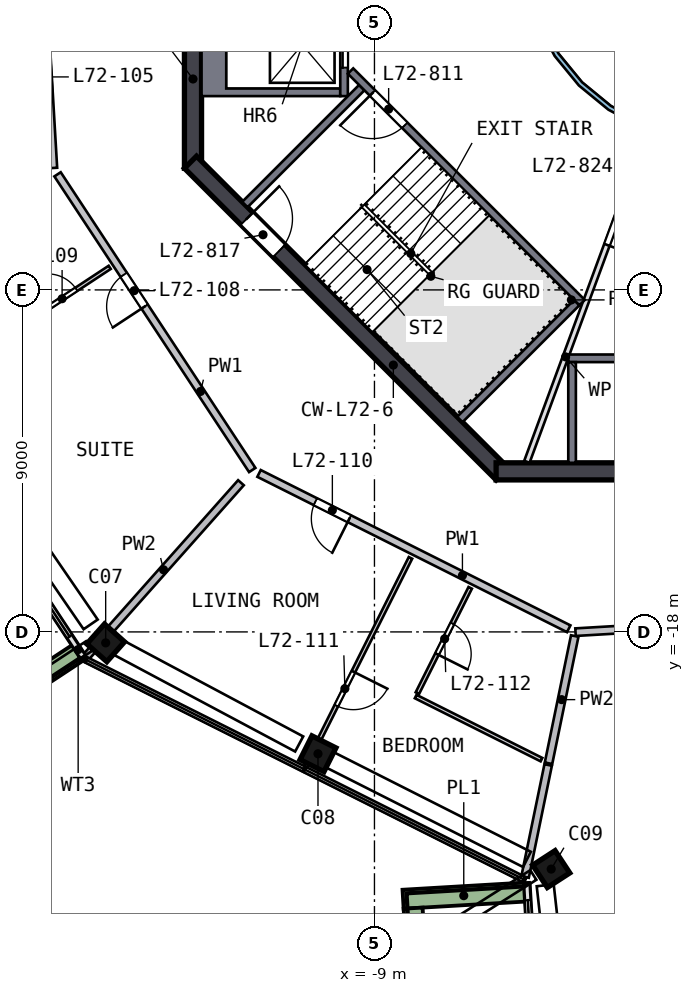
"""IFC4 building model, lengths in metres.
Left out: names, types, materials, properties, quantities, classifications, styles, units other than length and angle.
Written with IfcOpenShell. Run it as: python <this file> out.ifc"""

import sys

from ifc_helpers import new_model, si_unit, direction, frame, frame_2d, origin, origin_2d, place, context, subcontext, project, spatial, polyline, rectangle, outline, extrude, element, fill, save


model = new_model("IFC4")
c1 = context("Model", 3, precision=1e-05, world=origin(), true_north=direction((0.0, 1.0)))
c2 = subcontext(c1, "Body", "Model", "MODEL_VIEW")
j1 = project(units=[si_unit("LENGTHUNIT", "METRE"), si_unit("PLANEANGLEUNIT", "RADIAN")], contexts=[c1])
p1 = place(None, origin())
s1 = spatial("IfcSite", under=j1, at=p1, CompositionType="ELEMENT")
p2 = place(p1, origin())
s2 = spatial("IfcBuilding", under=s1, at=p2, CompositionType="ELEMENT")
p3 = place(p2, frame((0.0, 0.0, 291.5)))
s3 = spatial("IfcBuildingStorey", under=s2, at=p3, CompositionType="ELEMENT", Elevation=291.5)
p4 = place(p3, frame((-16.178, -18.196, 0.0), z_axis=(0.087194218, -0.076247429, 0.993269096), x_axis=(-0.742135032, 0.660166681, 0.115825506)))
e1 = element("IfcColumn", 1, at=p4, inside=s3, PredefinedType="COLUMN", context=c2, shape_type="SweptSolid", body=[
    extrude(rectangle(XDim=0.7, YDim=0.7, at=origin_2d()), origin(), (0.0, 0.0, 1.0), 3.212),
])
p5 = place(p3, frame((-10.608, -21.147, 0.0), z_axis=(0.100992141, -0.049659539, 0.993647079), x_axis=(0.88792749, -0.446004698, -0.112537025)))
e2 = element("IfcColumn", 2, at=p5, inside=s3, PredefinedType="COLUMN", context=c2, shape_type="SweptSolid", body=[
    extrude(rectangle(XDim=0.7, YDim=0.7, at=origin_2d()), origin(), (0.0, 0.0, 1.0), 3.21),
])
p6 = place(p3, frame((-4.488, -24.217, 0.0), z_axis=(0.11530423, -0.020370161, 0.993121338), x_axis=(-0.542404026, 0.836287858, 0.08012797)))
e3 = element("IfcColumn", 3, at=p6, inside=s3, PredefinedType="COLUMN", context=c2, shape_type="SweptSolid", body=[
    extrude(rectangle(XDim=0.7, YDim=0.7, at=origin_2d()), origin(), (0.0, 0.0, 1.0), 3.212),
])
p7 = place(p3, frame((-13.775, 5.799, 0.0), z_axis=(0.0, 0.0, 1.0), x_axis=(0.0, -1.0, 0.0)))
e4 = element("IfcWall", 4, at=p7, inside=s3, PredefinedType="SHEAR", context=c2, shape_type="SweptSolid", body=[
    extrude(rectangle(XDim=11.598, YDim=0.45, at=frame_2d((5.799, 0.0))), origin(), (0.0, 0.0, 1.0), 3.5),
])
p8 = place(p7, frame((4.899, 0.0, 0.0)))
e5 = element("IfcOpeningElement", 5, at=p8, cuts=e4, PredefinedType="OPENING", context=c2, shape_type="SweptSolid", body=[
    extrude(rectangle(XDim=1.8, YDim=2.1, at=frame_2d((0.9, 1.05))), frame((0.0, 0.235, 0.0), z_axis=(0.0, -1.0, 0.0), x_axis=(1.0, 0.0, 0.0)), (0.0, 0.0, 1.0), 0.47),
])
p9 = place(p3, frame((-13.841, -5.64, 0.0), z_axis=(0.0, 0.0, 1.0), x_axis=(0.707106781, -0.707106781, 0.0)))
e6 = element("IfcWall", 6, at=p9, inside=s3, PredefinedType="SHEAR", context=c2, shape_type="SweptSolid", body=[
    extrude(rectangle(XDim=11.598, YDim=0.45, at=frame_2d((5.799, 0.0))), origin(), (0.0, 0.0, 1.0), 3.5),
])
p10 = place(p9, frame((2.099, 0.0, 0.0)))
e7 = element("IfcOpeningElement", 7, at=p10, cuts=e6, PredefinedType="OPENING", context=c2, shape_type="SweptSolid", body=[
    extrude(rectangle(XDim=1.2, YDim=2.1, at=frame_2d((0.6, 1.05))), frame((0.0, 0.235, 0.0), z_axis=(0.0, -1.0, 0.0), x_axis=(1.0, 0.0, 0.0)), (0.0, 0.0, 1.0), 0.47),
])
p11 = place(p3, frame((-5.799, -13.775, 0.0), z_axis=(0.0, 0.0, 1.0), x_axis=(1.0, 0.0, 0.0)))
e8 = element("IfcWall", 8, at=p11, inside=s3, PredefinedType="SHEAR", context=c2, shape_type="SweptSolid", body=[
    extrude(rectangle(XDim=11.598, YDim=0.45, at=frame_2d((5.799, 0.0))), origin(), (0.0, 0.0, 1.0), 3.5),
])
p12 = place(p3, frame((-18.564, -15.781, 0.0), z_axis=(0.0, 0.0, 1.0), x_axis=(0.54985724, -0.835258652, 0.0)))
e9 = element("IfcWall", 9, at=p12, inside=s3, PredefinedType="SOLIDWALL", context=c2, shape_type="SweptSolid", body=[
    extrude(rectangle(XDim=3.427, YDim=0.15, at=frame_2d((1.713, 0.0))), origin(), (0.0, 0.0, 1.0), 2.525),
])
p13 = place(p12, frame((0.4, 0.0, 0.0)))
e10 = element("IfcOpeningElement", 10, at=p13, cuts=e9, PredefinedType="OPENING", context=c2, shape_type="SweptSolid", body=[
    extrude(rectangle(XDim=2.4, YDim=2.4, at=frame_2d((1.2, 1.2))), frame((0.0, 0.085, 0.0), z_axis=(0.0, -1.0, 0.0), x_axis=(1.0, 0.0, 0.0)), (0.0, 0.0, 1.0), 0.17),
])
p14 = place(p3, frame((-4.988, -24.663, 0.0), z_axis=(0.0, 0.0, 1.0), x_axis=(0.058592325, -0.998281994, 0.0)))
e11 = element("IfcWall", 11, at=p14, inside=s3, PredefinedType="SOLIDWALL", context=c2, shape_type="SweptSolid", body=[
    extrude(rectangle(XDim=3.2, YDim=0.15, at=frame_2d((1.6, 0.0))), origin(), (0.0, 0.0, 1.0), 2.525),
])
p15 = place(p14, frame((0.4, 0.0, 0.0)))
e12 = element("IfcOpeningElement", 12, at=p15, cuts=e11, PredefinedType="OPENING", context=c2, shape_type="SweptSolid", body=[
    extrude(rectangle(XDim=2.4, YDim=2.4, at=frame_2d((1.2, 1.2))), frame((0.0, 0.085, 0.0), z_axis=(0.0, -1.0, 0.0), x_axis=(1.0, 0.0, 0.0)), (0.0, 0.0, 1.0), 0.17),
])
p16 = place(p3, frame((-19.08, -20.044, 0.0), z_axis=(0.0, 0.0, 1.0), x_axis=(0.835250913, 0.549868995, 0.0)))
e13 = element("IfcWall", 13, at=p16, inside=s3, PredefinedType="SOLIDWALL", context=c2, shape_type="SweptSolid", body=[
    extrude(rectangle(XDim=2.699, YDim=0.5, at=frame_2d((1.35, 0.0))), origin(), (0.0, 0.0, 1.0), 0.7),
])
p17 = place(p3, frame((-5.053, -24.847, 0.0), z_axis=(0.0, 0.0, 1.0), x_axis=(-0.998280684, -0.058614646, 0.0)))
e14 = element("IfcWall", 14, at=p17, inside=s3, PredefinedType="SOLIDWALL", context=c2, shape_type="SweptSolid", body=[
    extrude(rectangle(XDim=3.199, YDim=0.5, at=frame_2d((1.6, 0.0))), origin(), (0.0, 0.0, 1.0), 0.7),
])
p18 = place(p3, frame((-7.983, -25.27, 0.0), z_axis=(0.0, 0.0, 1.0), x_axis=(0.058609711, -0.998280973, 0.0)))
e15 = element("IfcWall", 15, at=p18, inside=s3, PredefinedType="SOLIDWALL", context=c2, shape_type="SweptSolid", body=[
    extrude(rectangle(XDim=9.048, YDim=0.5, at=frame_2d((4.524, 0.0))), origin(), (0.0, 0.0, 1.0), 0.7),
])
p19 = place(p3, origin())
e16 = element("IfcWall", 16, at=p19, inside=s3, PredefinedType="SOLIDWALL", context=c2, shape_type="SweptSolid", body=[
    extrude(outline(polyline([(-13.55, -3.9), (-13.55, -1.2), (-9.9, -1.2), (-9.9, -1.4), (-12.9, -1.4), (-12.9, -3.7), (-9.9, -3.7), (-9.9, -3.9), (-13.55, -3.9)])), origin(), (0.0, 0.0, 1.0), 3.19),
])
p20 = place(p3, frame((-9.8, -1.2, 0.0), z_axis=(0.0, 0.0, 1.0), x_axis=(0.0, -1.0, 0.0)))
e17 = element("IfcWall", 17, at=p20, inside=s3, PredefinedType="SOLIDWALL", context=c2, shape_type="SweptSolid", body=[
    extrude(rectangle(XDim=2.7, YDim=0.2, at=frame_2d((1.35, 0.0))), origin(), (0.0, 0.0, 1.0), 3.19),
])
p21 = place(p20, frame((0.75, 0.0, 0.0)))
e18 = element("IfcOpeningElement", 18, at=p21, cuts=e17, PredefinedType="OPENING", context=c2, shape_type="SweptSolid", body=[
    extrude(rectangle(XDim=1.2, YDim=2.1, at=frame_2d((0.6, 1.05))), frame((0.0, 0.11, 0.0), z_axis=(0.0, -1.0, 0.0), x_axis=(1.0, 0.0, 0.0)), (0.0, 0.0, 1.0), 0.22),
])
p22 = place(p3, frame((-3.9, -10.8, 0.0), z_axis=(0.0, 0.0, 1.0), x_axis=(1.0, 0.0, 0.0)))
e19 = element("IfcWall", 19, at=p22, inside=s3, PredefinedType="SOLIDWALL", context=c2, shape_type="SweptSolid", body=[
    extrude(rectangle(XDim=7.8, YDim=0.2, at=frame_2d((3.9, 0.0))), origin(), (0.0, 0.0, 1.0), 3.19),
])
p23 = place(p22, frame((3.45, 0.0, 0.0)))
e20 = element("IfcOpeningElement", 20, at=p23, cuts=e19, PredefinedType="OPENING", context=c2, shape_type="SweptSolid", body=[
    extrude(rectangle(XDim=0.9, YDim=2.1, at=frame_2d((0.45, 1.05))), frame((0.0, 0.11, 0.0), z_axis=(0.0, -1.0, 0.0), x_axis=(1.0, 0.0, 0.0)), (0.0, 0.0, 1.0), 0.22),
])
p24 = place(p3, frame((-3.8, -10.9, 0.0), z_axis=(0.0, 0.0, 1.0), x_axis=(0.0, -1.0, 0.0)))
e21 = element("IfcWall", 21, at=p24, inside=s3, PredefinedType="SOLIDWALL", context=c2, shape_type="SweptSolid", body=[
    extrude(rectangle(XDim=2.65, YDim=0.2, at=frame_2d((1.325, 0.0))), origin(), (0.0, 0.0, 1.0), 3.19),
])
p25 = place(p3, frame((-3.535, -9.334, 0.0), z_axis=(0.0, 0.0, 1.0), x_axis=(-0.707120946, 0.707092617, 0.0)))
e22 = element("IfcWall", 22, at=p25, inside=s3, PredefinedType="SOLIDWALL", context=c2, shape_type="SweptSolid", body=[
    extrude(rectangle(XDim=8.618, YDim=0.2, at=frame_2d((4.309, 0.0))), origin(), (0.0, 0.0, 1.0), 3.19),
])
p26 = place(p25, frame((6.6, 0.0, 0.0)))
e23 = element("IfcOpeningElement", 23, at=p26, cuts=e22, PredefinedType="OPENING", context=c2, shape_type="SweptSolid", body=[
    extrude(rectangle(XDim=1.2, YDim=2.1, at=frame_2d((0.6, 1.05))), frame((0.0, 0.11, 0.0), z_axis=(0.0, -1.0, 0.0), x_axis=(1.0, 0.0, 0.0)), (0.0, 0.0, 1.0), 0.22),
])
for number, where, z_axis, x_axis in (
    (24, (-9.334, -3.677, 0.0), (0.0, 0.0, 1.0), (-0.707, -0.707, 0.0)),
    (25, (-3.677, -9.334, 0.0), (0.0, 0.0, 1.0), (-0.707, -0.707, 0.0)),
):
    element("IfcWall", number, at=place(p3, frame(where, z_axis=z_axis, x_axis=x_axis)), inside=s3, PredefinedType="SOLIDWALL", context=c2, shape_type="SweptSolid", body=[
        extrude(rectangle(XDim=4.35, YDim=0.2, at=frame_2d((2.175, 0.0))), origin(), (0.0, 0.0, 1.0), 3.19),
    ])
p27 = place(p3, frame((-1.776, -4.813, 0.0), z_axis=(0.0, 0.0, 1.0), x_axis=(-0.346114844, -0.938192152, 0.0)))
e26 = element("IfcWall", 26, at=p27, inside=s3, PredefinedType="PARTITIONING", context=c2, shape_type="SweptSolid", body=[
    extrude(rectangle(XDim=9.283, YDim=0.15, at=frame_2d((4.641, 0.0))), origin(), (0.0, 0.0, 1.0), 3.19),
])
p28 = place(p27, frame((1.4, 0.0, 0.0)))
e27 = element("IfcOpeningElement", 27, at=p28, cuts=e26, PredefinedType="OPENING", context=c2, shape_type="SweptSolid", body=[
    extrude(rectangle(XDim=1.8, YDim=2.1, at=frame_2d((0.9, 1.05))), frame((0.0, 0.085, 0.0), z_axis=(0.0, -1.0, 0.0), x_axis=(1.0, 0.0, 0.0)), (0.0, 0.0, 1.0), 0.17),
])
p29 = place(p3, origin())
e28 = element("IfcWall", 28, at=p29, inside=s3, PredefinedType="SOLIDWALL", context=c2, shape_type="SweptSolid", body=[
    extrude(outline(polyline([(5.021, -0.999), (4.73, -1.959), (4.257, -2.844), (3.62, -3.62), (2.844, -4.257), (1.959, -4.73), (0.999, -5.021), (0.0, -5.12), (-0.999, -5.021), (-1.959, -4.73), (-2.844, -4.257), (-3.62, -3.62), (-4.257, -2.844), (-4.73, -1.959), (-5.021, -0.999), (-5.12, 0.0), (-5.021, 0.999), (-4.73, 1.959), (-4.257, 2.844), (-3.62, 3.62), (-2.844, 4.257), (-1.959, 4.73), (-0.999, 5.021), (0.0, 5.12), (0.999, 5.021), (1.959, 4.73), (2.844, 4.257), (3.62, 3.62), (4.257, 2.844), (4.73, 1.959), (5.021, 0.999), (5.12, 0.0), (5.021, -0.999)]), holes=[polyline([(4.904, 0.976), (4.619, 1.913), (4.157, 2.778), (3.535, 3.535), (2.778, 4.157), (1.913, 4.619), (0.976, 4.904), (0.0, 5.0), (-0.976, 4.904), (-1.913, 4.619), (-2.778, 4.157), (-3.535, 3.535), (-4.157, 2.778), (-4.619, 1.913), (-4.904, 0.976), (-5.0, 0.0), (-4.904, -0.976), (-4.619, -1.913), (-4.157, -2.778), (-3.535, -3.535), (-2.778, -4.157), (-1.913, -4.619), (-0.976, -4.904), (0.0, -5.0), (0.976, -4.904), (1.913, -4.619), (2.778, -4.157), (3.535, -3.535), (4.157, -2.778), (4.619, -1.913), (4.904, -0.976), (5.0, 0.0), (4.904, 0.976)])]), origin(), (0.0, 0.0, 1.0), 3.19),
])
p30 = place(p3, frame((-17.449, -5.791, 0.0), z_axis=(0.0, 0.0, 1.0), x_axis=(-0.058619102, 0.998280422, 0.0)))
e29 = element("IfcWall", 29, at=p30, inside=s3, PredefinedType="SOLIDWALL", context=c2, shape_type="SweptSolid", body=[
    extrude(rectangle(XDim=9.317, YDim=0.2, at=frame_2d((4.658, 0.0))), origin(), (0.0, 0.0, 1.0), 3.19),
])
p31 = place(p30, frame((1.9, 0.0, 0.0)))
e30 = element("IfcOpeningElement", 30, at=p31, cuts=e29, PredefinedType="OPENING", context=c2, shape_type="SweptSolid", body=[
    extrude(rectangle(XDim=1.0, YDim=2.1, at=frame_2d((0.5, 1.05))), frame((0.0, 0.11, 0.0), z_axis=(0.0, -1.0, 0.0), x_axis=(1.0, 0.0, 0.0)), (0.0, 0.0, 1.0), 0.22),
])
p32 = place(p3, frame((-12.216, -13.74, 0.0), z_axis=(0.0, 0.0, 1.0), x_axis=(-0.549889366, 0.835237502, 0.0)))
e31 = element("IfcWall", 31, at=p32, inside=s3, PredefinedType="SOLIDWALL", context=c2, shape_type="SweptSolid", body=[
    extrude(rectangle(XDim=9.316, YDim=0.2, at=frame_2d((4.658, 0.0))), origin(), (0.0, 0.0, 1.0), 3.19),
])
p33 = place(p32, frame((5.15, 0.0, 0.0)))
e32 = element("IfcOpeningElement", 32, at=p33, cuts=e31, PredefinedType="OPENING", context=c2, shape_type="SweptSolid", body=[
    extrude(rectangle(XDim=1.0, YDim=2.1, at=frame_2d((0.5, 1.05))), frame((0.0, 0.11, 0.0), z_axis=(0.0, -1.0, 0.0), x_axis=(1.0, 0.0, 0.0)), (0.0, 0.0, 1.0), 0.22),
])
p34 = place(p3, frame((-3.888, -17.917, 0.0), z_axis=(0.0, 0.0, 1.0), x_axis=(-0.893848004, 0.448370098, 0.0)))
e33 = element("IfcWall", 33, at=p34, inside=s3, PredefinedType="SOLIDWALL", context=c2, shape_type="SweptSolid", body=[
    extrude(rectangle(XDim=9.117, YDim=0.2, at=frame_2d((4.558, 0.0))), origin(), (0.0, 0.0, 1.0), 3.19),
])
p35 = place(p34, frame((6.458, 0.0, 0.0)))
e34 = element("IfcOpeningElement", 34, at=p35, cuts=e33, PredefinedType="OPENING", context=c2, shape_type="SweptSolid", body=[
    extrude(rectangle(XDim=1.0, YDim=2.1, at=frame_2d((0.5, 1.05))), frame((0.0, 0.11, 0.0), z_axis=(0.0, -1.0, 0.0), x_axis=(1.0, 0.0, 0.0)), (0.0, 0.0, 1.0), 0.22),
])
p36 = place(p3, frame((5.791, -17.449, 0.0), z_axis=(0.0, 0.0, 1.0), x_axis=(-0.998281884, -0.058594193, 0.0)))
e35 = element("IfcWall", 35, at=p36, inside=s3, PredefinedType="SOLIDWALL", context=c2, shape_type="SweptSolid", body=[
    extrude(rectangle(XDim=9.517, YDim=0.2, at=frame_2d((4.758, 0.0))), origin(), (0.0, 0.0, 1.0), 3.19),
])
p37 = place(p36, frame((3.836, 0.0, 0.0)))
e36 = element("IfcOpeningElement", 36, at=p37, cuts=e35, PredefinedType="OPENING", context=c2, shape_type="SweptSolid", body=[
    extrude(rectangle(XDim=1.8, YDim=2.1, at=frame_2d((0.9, 1.05))), frame((0.0, 0.11, 0.0), z_axis=(0.0, -1.0, 0.0), x_axis=(1.0, 0.0, 0.0)), (0.0, 0.0, 1.0), 0.22),
])
p38 = place(p3, frame((-12.513, -14.074, 0.0), z_axis=(0.0, 0.0, 1.0), x_axis=(-0.664445384, -0.747336826, 0.0)))
e37 = element("IfcWall", 37, at=p38, inside=s3, PredefinedType="SOLIDWALL", context=c2, shape_type="SweptSolid", body=[
    extrude(rectangle(XDim=6.132, YDim=0.2, at=frame_2d((3.066, 0.0))), origin(), (0.0, 0.0, 1.0), 3.19),
])
p39 = place(p3, frame((-5.037, -24.451, 0.0), z_axis=(0.0, 0.0, 1.0), x_axis=(0.201787882, 0.979429248, 0.0)))
e38 = element("IfcWall", 38, at=p39, inside=s3, PredefinedType="SOLIDWALL", context=c2, shape_type="SweptSolid", body=[
    extrude(rectangle(XDim=3.011, YDim=0.2, at=frame_2d((1.506, 0.0))), origin(), (0.0, 0.0, 1.0), 3.19),
])
p40 = place(p3, frame((-4.42, -21.456, 0.0), z_axis=(0.0, 0.0, 1.0), x_axis=(0.201757706, 0.979435464, 0.0)))
e39 = element("IfcWall", 39, at=p40, inside=s3, PredefinedType="SOLIDWALL", context=c2, shape_type="SweptSolid", body=[
    extrude(rectangle(XDim=3.418, YDim=0.2, at=frame_2d((1.709, 0.0))), origin(), (0.0, 0.0, 1.0), 3.19),
])
p41 = place(p3, frame((-18.555, -10.111, 0.0), z_axis=(0.0, 0.0, 1.0), x_axis=(0.835199098, 0.549947695, 0.0)))
e40 = element("IfcWall", 40, at=p41, inside=s3, PredefinedType="PARTITIONING", context=c2, shape_type="SweptSolid", body=[
    extrude(rectangle(XDim=3.1, YDim=0.1, at=frame_2d((1.55, 0.0))), origin(), (0.0, 0.0, 1.0), 3.19),
])
p42 = place(p41, frame((1.15, 0.0, 0.0)))
e41 = element("IfcOpeningElement", 41, at=p42, cuts=e40, PredefinedType="OPENING", context=c2, shape_type="SweptSolid", body=[
    extrude(rectangle(XDim=0.9, YDim=2.1, at=frame_2d((0.45, 1.05))), frame((0.0, 0.06, 0.0), z_axis=(0.0, -1.0, 0.0), x_axis=(1.0, 0.0, 0.0)), (0.0, 0.0, 1.0), 0.12),
])
p43 = place(p3, frame((-8.052, -16.052, 0.0), z_axis=(0.0, 0.0, 1.0), x_axis=(-0.448388269, -0.89383889, 0.0)))
e42 = element("IfcWall", 42, at=p43, inside=s3, PredefinedType="PARTITIONING", context=c2, shape_type="SweptSolid", body=[
    extrude(rectangle(XDim=6.15, YDim=0.1, at=frame_2d((3.075, 0.0))), origin(), (0.0, 0.0, 1.0), 3.19),
])
p44 = place(p43, frame((3.35, 0.0, 0.0)))
e43 = element("IfcOpeningElement", 43, at=p44, cuts=e42, PredefinedType="OPENING", context=c2, shape_type="SweptSolid", body=[
    extrude(rectangle(XDim=1.0, YDim=2.1, at=frame_2d((0.5, 1.05))), frame((0.0, 0.06, 0.0), z_axis=(0.0, -1.0, 0.0), x_axis=(1.0, 0.0, 0.0)), (0.0, 0.0, 1.0), 0.12),
])
p45 = place(p3, frame((-6.48, -16.84, 0.0), z_axis=(0.0, 0.0, 1.0), x_axis=(-0.448441781, -0.893812043, 0.0)))
e44 = element("IfcWall", 44, at=p45, inside=s3, PredefinedType="PARTITIONING", context=c2, shape_type="SweptSolid", body=[
    extrude(rectangle(XDim=3.1, YDim=0.1, at=frame_2d((1.55, 0.0))), origin(), (0.0, 0.0, 1.0), 3.19),
])
p46 = place(p45, frame((1.05, 0.0, 0.0)))
e45 = element("IfcOpeningElement", 45, at=p46, cuts=e44, PredefinedType="OPENING", context=c2, shape_type="SweptSolid", body=[
    extrude(rectangle(XDim=0.9, YDim=2.1, at=frame_2d((0.45, 1.05))), frame((0.0, 0.06, 0.0), z_axis=(0.0, -1.0, 0.0), x_axis=(1.0, 0.0, 0.0)), (0.0, 0.0, 1.0), 0.12),
])
p47 = place(p3, frame((-7.915, -19.701, 0.0), z_axis=(0.0, 0.0, 1.0), x_axis=(0.893859612, -0.448346957, 0.0)))
e46 = element("IfcWall", 46, at=p47, inside=s3, PredefinedType="PARTITIONING", context=c2, shape_type="SweptSolid", body=[
    extrude(rectangle(XDim=3.704, YDim=0.1, at=frame_2d((1.852, 0.0))), origin(), (0.0, 0.0, 1.0), 3.19),
])
p48 = place(p13, origin())
e47 = element("IfcDoor", 47, at=p48, inside=s3, OperationType="SLIDING_TO_RIGHT", PredefinedType="DOOR", context=c2, shape_type="SweptSolid", body=[
    extrude(rectangle(XDim=2.4, YDim=2.4, at=frame_2d((1.2, 1.2))), frame((0.0, 0.025, 0.0), z_axis=(0.0, -1.0, 0.0), x_axis=(1.0, 0.0, 0.0)), (0.0, 0.0, 1.0), 0.05),
])
fill(e10, e47)
p49 = place(p15, origin())
e48 = element("IfcDoor", 48, at=p49, inside=s3, OperationType="SLIDING_TO_LEFT", PredefinedType="DOOR", context=c2, shape_type="SweptSolid", body=[
    extrude(rectangle(XDim=2.4, YDim=2.4, at=frame_2d((1.2, 1.2))), frame((0.0, 0.025, 0.0), z_axis=(0.0, -1.0, 0.0), x_axis=(1.0, 0.0, 0.0)), (0.0, 0.0, 1.0), 0.05),
])
fill(e12, e48)
p50 = place(p21, origin())
e49 = element("IfcDoor", 49, at=p50, inside=s3, OperationType="DOUBLE_DOOR_SLIDING", PredefinedType="DOOR", context=c2, shape_type="SweptSolid", body=[
    extrude(rectangle(XDim=1.2, YDim=2.1, at=frame_2d((0.6, 1.05))), frame((0.0, 0.025, 0.0), z_axis=(0.0, -1.0, 0.0), x_axis=(1.0, 0.0, 0.0)), (0.0, 0.0, 1.0), 0.05),
])
fill(e18, e49)
p51 = place(p26, origin())
e50 = element("IfcDoor", 50, at=p51, inside=s3, OperationType="SINGLE_SWING_RIGHT", PredefinedType="DOOR", context=c2, shape_type="SweptSolid", body=[
    extrude(rectangle(XDim=1.2, YDim=2.1, at=frame_2d((0.6, 1.05))), frame((0.0, 0.025, 0.0), z_axis=(0.0, -1.0, 0.0), x_axis=(1.0, 0.0, 0.0)), (0.0, 0.0, 1.0), 0.05),
])
fill(e23, e50)
p52 = place(p10, origin())
e51 = element("IfcDoor", 51, at=p52, inside=s3, OperationType="SINGLE_SWING_LEFT", PredefinedType="DOOR", context=c2, shape_type="SweptSolid", body=[
    extrude(rectangle(XDim=1.2, YDim=2.1, at=frame_2d((0.6, 1.05))), frame((0.0, 0.025, 0.0), z_axis=(0.0, -1.0, 0.0), x_axis=(1.0, 0.0, 0.0)), (0.0, 0.0, 1.0), 0.05),
])
fill(e7, e51)
p53 = place(p28, origin())
e52 = element("IfcDoor", 52, at=p53, inside=s3, OperationType="DOUBLE_DOOR_SINGLE_SWING", PredefinedType="DOOR", context=c2, shape_type="SweptSolid", body=[
    extrude(rectangle(XDim=1.8, YDim=2.1, at=frame_2d((0.9, 1.05))), frame((0.0, 0.025, 0.0), z_axis=(0.0, -1.0, 0.0), x_axis=(1.0, 0.0, 0.0)), (0.0, 0.0, 1.0), 0.05),
])
fill(e27, e52)
p54 = place(p33, origin())
e53 = element("IfcDoor", 53, at=p54, inside=s3, OperationType="SINGLE_SWING_LEFT", PredefinedType="DOOR", context=c2, shape_type="SweptSolid", body=[
    extrude(rectangle(XDim=1.0, YDim=2.1, at=frame_2d((0.5, 1.05))), frame((0.0, 0.025, 0.0), z_axis=(0.0, -1.0, 0.0), x_axis=(1.0, 0.0, 0.0)), (0.0, 0.0, 1.0), 0.05),
])
fill(e32, e53)
p55 = place(p42, origin())
e54 = element("IfcDoor", 54, at=p55, inside=s3, OperationType="SINGLE_SWING_LEFT", PredefinedType="DOOR", context=c2, shape_type="SweptSolid", body=[
    extrude(rectangle(XDim=0.9, YDim=2.1, at=frame_2d((0.45, 1.05))), frame((0.0, 0.025, 0.0), z_axis=(0.0, -1.0, 0.0), x_axis=(1.0, 0.0, 0.0)), (0.0, 0.0, 1.0), 0.05),
])
fill(e41, e54)
p56 = place(p35, origin())
e55 = element("IfcDoor", 55, at=p56, inside=s3, OperationType="SINGLE_SWING_LEFT", PredefinedType="DOOR", context=c2, shape_type="SweptSolid", body=[
    extrude(rectangle(XDim=1.0, YDim=2.1, at=frame_2d((0.5, 1.05))), frame((0.0, 0.025, 0.0), z_axis=(0.0, -1.0, 0.0), x_axis=(1.0, 0.0, 0.0)), (0.0, 0.0, 1.0), 0.05),
])
fill(e34, e55)
p57 = place(p44, origin())
e56 = element("IfcDoor", 56, at=p57, inside=s3, OperationType="SINGLE_SWING_LEFT", PredefinedType="DOOR", context=c2, shape_type="SweptSolid", body=[
    extrude(rectangle(XDim=1.0, YDim=2.1, at=frame_2d((0.5, 1.05))), frame((0.0, 0.025, 0.0), z_axis=(0.0, -1.0, 0.0), x_axis=(1.0, 0.0, 0.0)), (0.0, 0.0, 1.0), 0.05),
])
fill(e43, e56)
p58 = place(p46, origin())
e57 = element("IfcDoor", 57, at=p58, inside=s3, OperationType="SINGLE_SWING_RIGHT", PredefinedType="DOOR", context=c2, shape_type="SweptSolid", body=[
    extrude(rectangle(XDim=0.9, YDim=2.1, at=frame_2d((0.45, 1.05))), frame((0.0, 0.025, 0.0), z_axis=(0.0, -1.0, 0.0), x_axis=(1.0, 0.0, 0.0)), (0.0, 0.0, 1.0), 0.05),
])
fill(e45, e57)
save(model, sys.argv[1])
